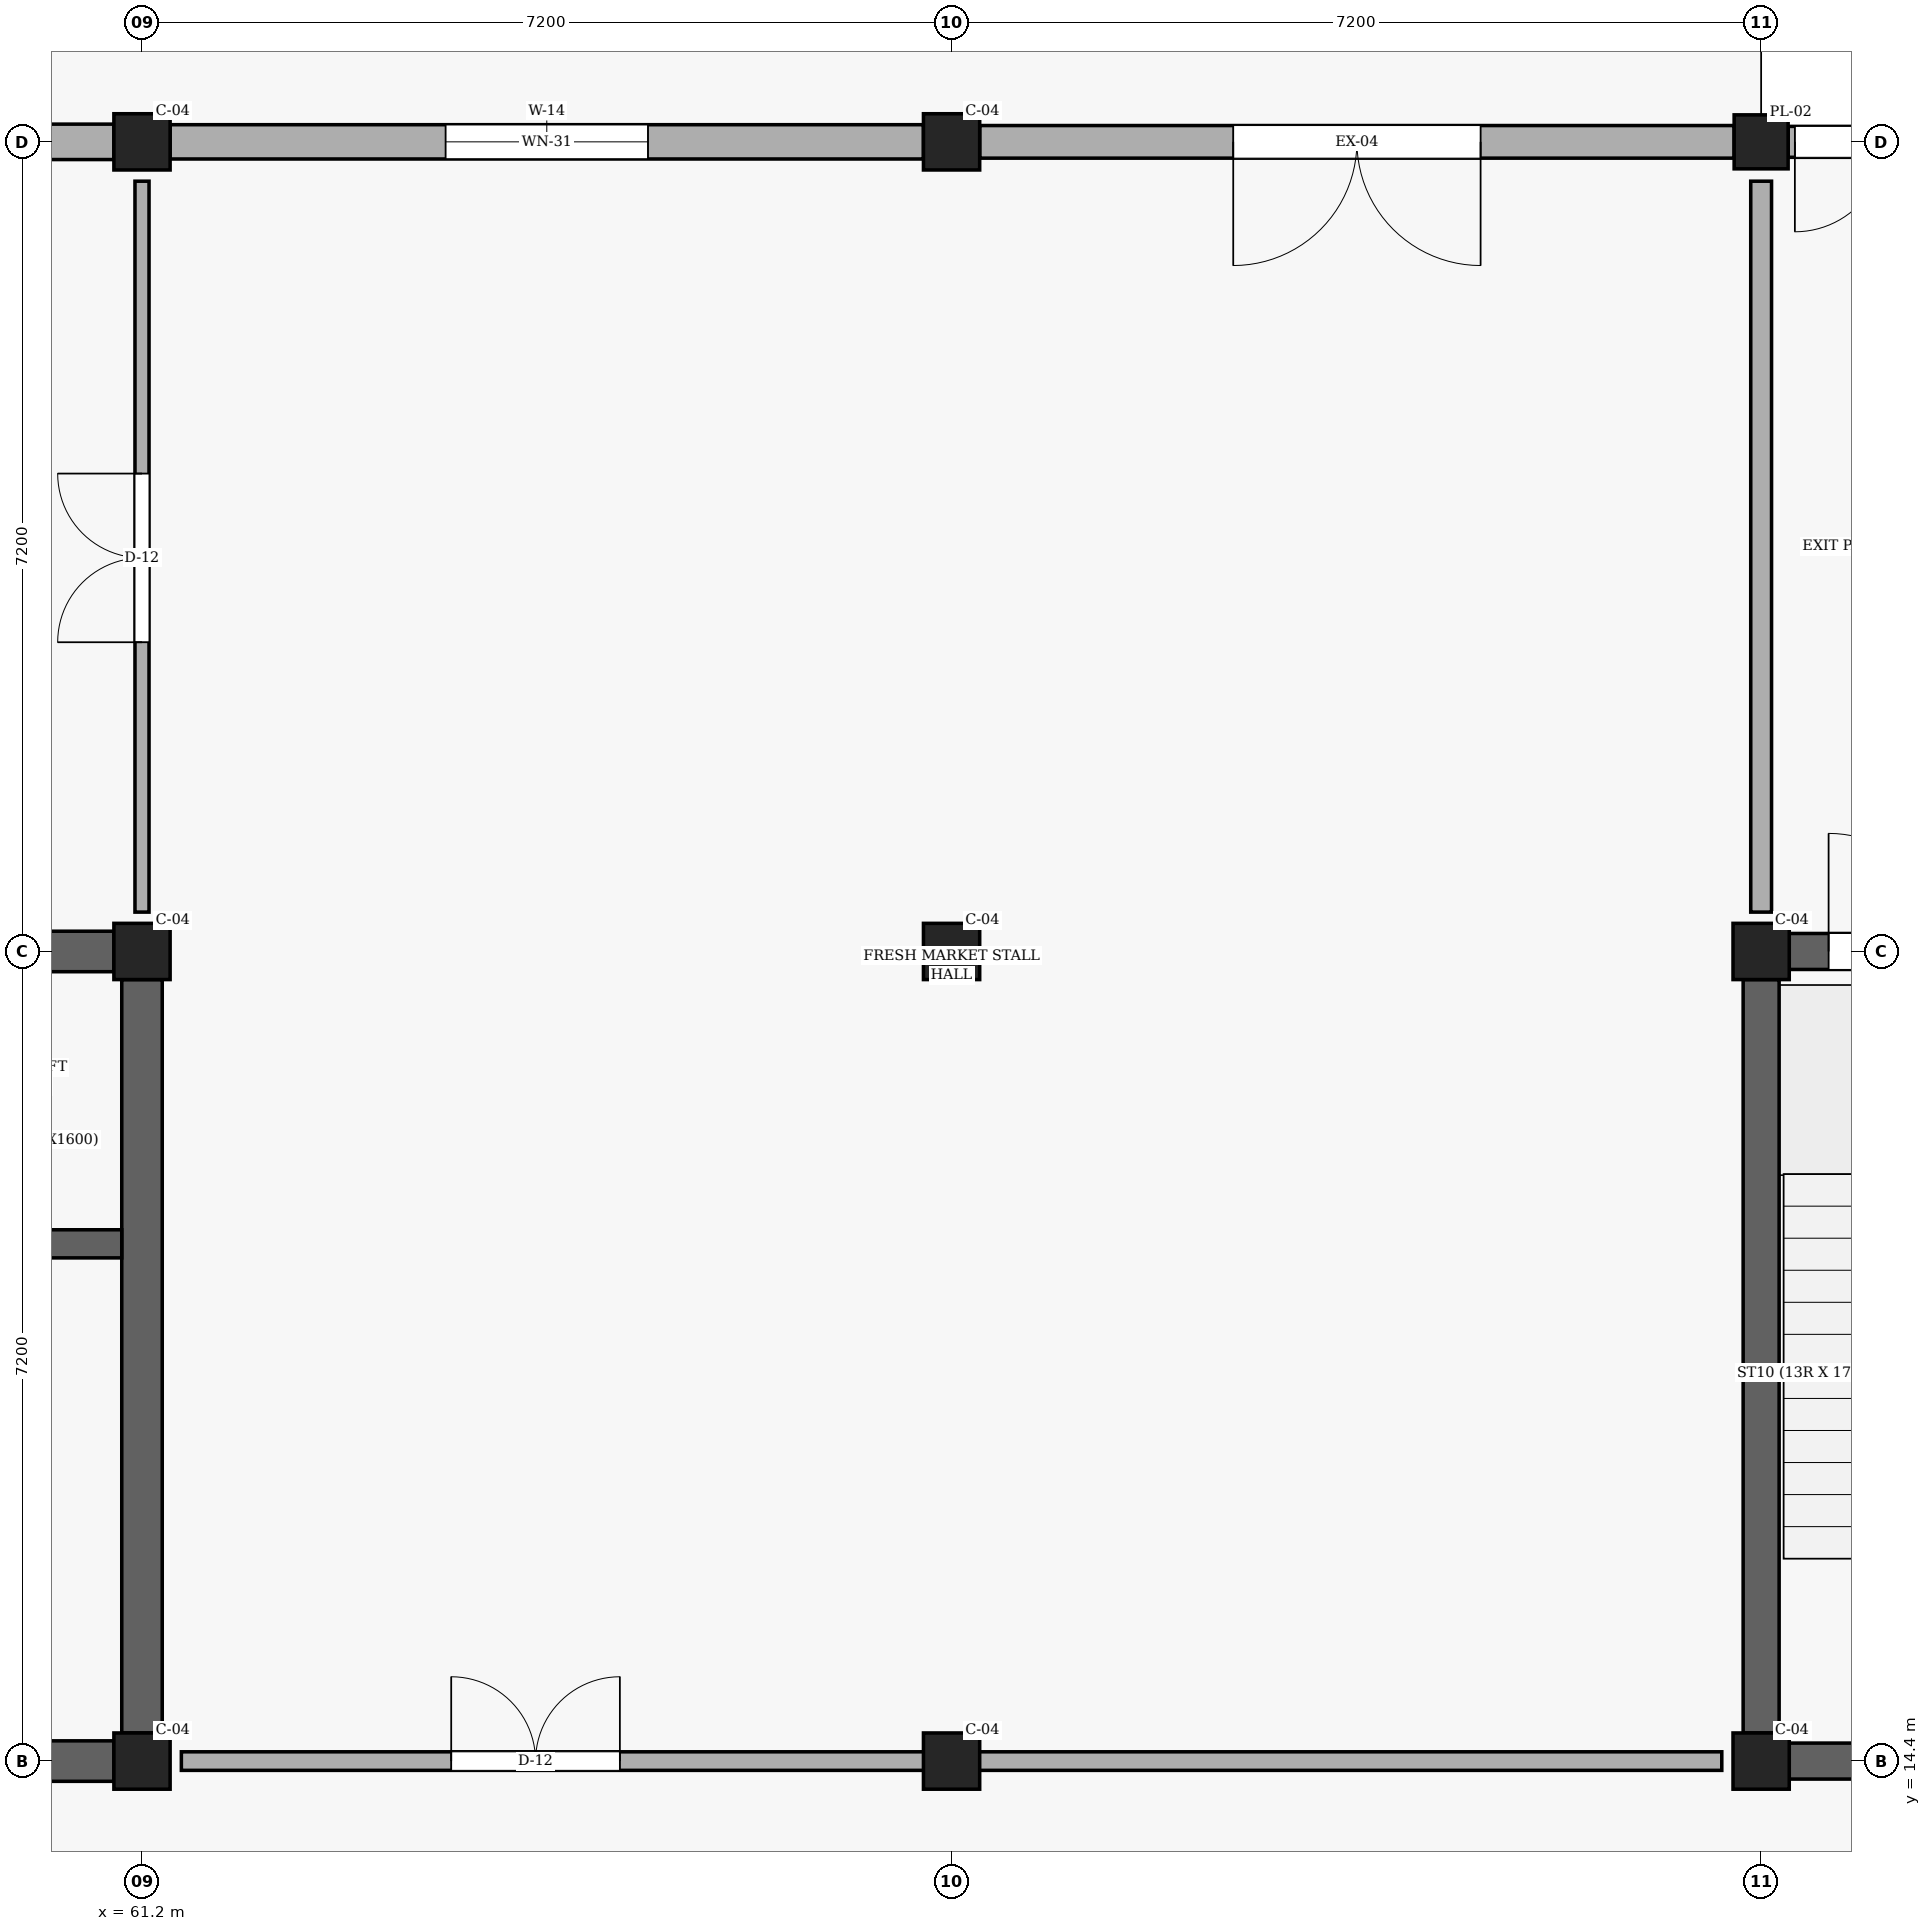
"""IFC4 building model, lengths in metres.
Left out: names, types, materials, properties, quantities, classifications, styles, units other than length and angle.
Written with IfcOpenShell. Run it as: python <this file> out.ifc"""

import sys

from ifc_helpers import new_model, si_unit, direction, frame, frame_2d, origin, origin_2d, place, context, subcontext, project, spatial, rectangle, extrude, element, fill, save


model = new_model("IFC4")
c1 = context("Model", 3, precision=1e-05, world=origin(), true_north=direction((0.0, 1.0)))
c2 = subcontext(c1, "Body", "Model", "MODEL_VIEW")
j1 = project(units=[si_unit("LENGTHUNIT", "METRE"), si_unit("PLANEANGLEUNIT", "RADIAN")], contexts=[c1])
p1 = place(None, origin())
s1 = spatial("IfcSite", under=j1, at=p1, CompositionType="ELEMENT")
p2 = place(p1, origin())
s2 = spatial("IfcBuilding", under=s1, at=p2, CompositionType="ELEMENT")
p3 = place(p2, origin())
s3 = spatial("IfcBuildingStorey", under=s2, at=p3, CompositionType="ELEMENT", Elevation=0.0)
for number, where, z_axis, x_axis in (
    (1, (61.2, 14.4, 0.0), (0.0, 0.0, 1.0), (1.0, 0.0, 0.0)),
    (2, (61.2, 21.6, 0.0), (0.0, 0.0, 1.0), (1.0, 0.0, 0.0)),
    (3, (61.2, 28.8, 0.0), (0.0, 0.0, 1.0), (1.0, 0.0, 0.0)),
    (4, (68.4, 14.4, 0.0), (0.0, 0.0, 1.0), (1.0, 0.0, 0.0)),
    (5, (68.4, 21.6, 0.0), (0.0, 0.0, 1.0), (1.0, 0.0, 0.0)),
    (6, (68.4, 28.8, 0.0), (0.0, 0.0, 1.0), (1.0, 0.0, 0.0)),
    (7, (75.6, 14.4, 0.0), (0.0, 0.0, 1.0), (1.0, 0.0, 0.0)),
    (8, (75.6, 21.6, 0.0), (0.0, 0.0, 1.0), (1.0, 0.0, 0.0)),
):
    element("IfcColumn", number, at=place(p3, frame(where, z_axis=z_axis, x_axis=x_axis)), inside=s3, PredefinedType="COLUMN", context=c2, shape_type="SweptSolid", body=[
        extrude(rectangle(XDim=0.5, YDim=0.5, at=origin_2d()), origin(), (0.0, 0.0, 1.0), 4.5),
    ])
p4 = place(p3, frame((75.6, 28.8, 0.0), z_axis=(0.0, 0.0, 1.0), x_axis=(1.0, 0.0, 0.0)))
e9 = element("IfcColumn", 9, at=p4, inside=s3, PredefinedType="PILASTER", context=c2, shape_type="SweptSolid", body=[
    extrude(rectangle(XDim=0.48, YDim=0.48, at=origin_2d()), origin(), (0.0, 0.0, 1.0), 4.5),
])
p5 = place(p3, frame((82.55, 28.8, 0.0), z_axis=(0.0, 0.0, 1.0), x_axis=(-1.0, 0.0, 0.0)))
e10 = element("IfcWall", 10, at=p5, inside=s3, PredefinedType="SOLIDWALL", context=c2, shape_type="SweptSolid", body=[
    extrude(rectangle(XDim=6.71, YDim=0.275, at=frame_2d((3.355, 0.0))), origin(), (0.0, 0.0, 1.0), 3.83),
])
p6 = place(p5, frame((2.305, 0.0, 0.85)))
e11 = element("IfcOpeningElement", 11, at=p6, cuts=e10, PredefinedType="OPENING", context=c2, shape_type="SweptSolid", body=[
    extrude(rectangle(XDim=2.1, YDim=2.1, at=frame_2d((1.05, 1.05))), frame((0.0, 0.147, 0.0), z_axis=(0.0, -1.0, 0.0), x_axis=(1.0, 0.0, 0.0)), (0.0, 0.0, 1.0), 0.295),
])
p7 = place(p5, frame((5.05, 0.0, 0.0)))
e12 = element("IfcOpeningElement", 12, at=p7, cuts=e10, PredefinedType="OPENING", context=c2, shape_type="SweptSolid", body=[
    extrude(rectangle(XDim=1.6, YDim=2.25, at=frame_2d((0.8, 1.125))), frame((0.0, 0.147, 0.0), z_axis=(0.0, -1.0, 0.0), x_axis=(1.0, 0.0, 0.0)), (0.0, 0.0, 1.0), 0.295),
])
p8 = place(p3, frame((75.36, 28.8, 0.0), z_axis=(0.0, 0.0, 1.0), x_axis=(-1.0, 0.0, 0.0)))
e13 = element("IfcWall", 13, at=p8, inside=s3, PredefinedType="SOLIDWALL", context=c2, shape_type="SweptSolid", body=[
    extrude(rectangle(XDim=6.71, YDim=0.29, at=frame_2d((3.355, 0.0))), origin(), (0.0, 0.0, 1.0), 3.83),
])
p9 = place(p8, frame((2.255, 0.0, 0.0)))
e14 = element("IfcOpeningElement", 14, at=p9, cuts=e13, PredefinedType="OPENING", context=c2, shape_type="SweptSolid", body=[
    extrude(rectangle(XDim=2.2, YDim=2.35, at=frame_2d((1.1, 1.175))), frame((0.0, 0.155, 0.0), z_axis=(0.0, -1.0, 0.0), x_axis=(1.0, 0.0, 0.0)), (0.0, 0.0, 1.0), 0.31),
])
p10 = place(p3, frame((68.15, 28.8, 0.0), z_axis=(0.0, 0.0, 1.0), x_axis=(-1.0, 0.0, 0.0)))
e15 = element("IfcWall", 15, at=p10, inside=s3, PredefinedType="SOLIDWALL", context=c2, shape_type="SweptSolid", body=[
    extrude(rectangle(XDim=6.7, YDim=0.305, at=frame_2d((3.35, 0.0))), origin(), (0.0, 0.0, 1.0), 3.83),
])
p11 = place(p10, frame((2.45, 0.0, 0.85)))
e16 = element("IfcOpeningElement", 16, at=p11, cuts=e15, PredefinedType="OPENING", context=c2, shape_type="SweptSolid", body=[
    extrude(rectangle(XDim=1.8, YDim=2.1, at=frame_2d((0.9, 1.05))), frame((0.0, 0.163, 0.0), z_axis=(0.0, -1.0, 0.0), x_axis=(1.0, 0.0, 0.0)), (0.0, 0.0, 1.0), 0.325),
])
p12 = place(p3, frame((60.95, 28.8, 0.0), z_axis=(0.0, 0.0, 1.0), x_axis=(-1.0, 0.0, 0.0)))
e17 = element("IfcWall", 17, at=p12, inside=s3, PredefinedType="SOLIDWALL", context=c2, shape_type="SweptSolid", body=[
    extrude(rectangle(XDim=6.71, YDim=0.315, at=frame_2d((3.355, 0.0))), origin(), (0.0, 0.0, 1.0), 3.83),
])
p13 = place(p12, frame((2.555, 0.0, 0.0)))
e18 = element("IfcOpeningElement", 18, at=p13, cuts=e17, PredefinedType="OPENING", context=c2, shape_type="SweptSolid", body=[
    extrude(rectangle(XDim=1.6, YDim=2.25, at=frame_2d((0.8, 1.125))), frame((0.0, 0.167, 0.0), z_axis=(0.0, -1.0, 0.0), x_axis=(1.0, 0.0, 0.0)), (0.0, 0.0, 1.0), 0.335),
])
p14 = place(p3, frame((54.25, 21.6, 0.0), z_axis=(0.0, 0.0, 1.0), x_axis=(1.0, 0.0, 0.0)))
e19 = element("IfcWall", 19, at=p14, inside=s3, PredefinedType="SHEAR", context=c2, shape_type="SweptSolid", body=[
    extrude(rectangle(XDim=6.7, YDim=0.36, at=frame_2d((3.35, 0.0))), origin(), (0.0, 0.0, 1.0), 4.26),
])
p15 = place(p3, frame((61.2, 14.65, 0.0), z_axis=(0.0, 0.0, 1.0), x_axis=(0.0, 1.0, 0.0)))
e20 = element("IfcWall", 20, at=p15, inside=s3, PredefinedType="SHEAR", context=c2, shape_type="SweptSolid", body=[
    extrude(rectangle(XDim=6.7, YDim=0.36, at=frame_2d((3.35, 0.0))), origin(), (0.0, 0.0, 1.0), 4.26),
])
p16 = place(p3, frame((54.25, 14.4, 0.0), z_axis=(0.0, 0.0, 1.0), x_axis=(1.0, 0.0, 0.0)))
e21 = element("IfcWall", 21, at=p16, inside=s3, PredefinedType="SHEAR", context=c2, shape_type="SweptSolid", body=[
    extrude(rectangle(XDim=6.7, YDim=0.36, at=frame_2d((3.35, 0.0))), origin(), (0.0, 0.0, 1.0), 4.26),
])
p17 = place(p16, frame((4.5, 0.0, 0.0)))
e22 = element("IfcOpeningElement", 22, at=p17, cuts=e21, PredefinedType="OPENING", context=c2, shape_type="SweptSolid", body=[
    extrude(rectangle(XDim=1.1, YDim=2.15, at=frame_2d((0.55, 1.075))), frame((0.0, 0.19, 0.0), z_axis=(0.0, -1.0, 0.0), x_axis=(1.0, 0.0, 0.0)), (0.0, 0.0, 1.0), 0.38),
])
p18 = place(p3, frame((57.725, 19.0, 0.0), z_axis=(0.0, 0.0, 1.0), x_axis=(1.0, 0.0, 0.0)))
e23 = element("IfcWall", 23, at=p18, inside=s3, PredefinedType="SHEAR", context=c2, shape_type="SweptSolid", body=[
    extrude(rectangle(XDim=3.295, YDim=0.25, at=frame_2d((1.647, 0.0))), origin(), (0.0, 0.0, 1.0), 4.26),
])
p19 = place(p18, frame((1.1, 0.0, 0.0)))
e24 = element("IfcOpeningElement", 24, at=p19, cuts=e23, PredefinedType="OPENING", context=c2, shape_type="SweptSolid", body=[
    extrude(rectangle(XDim=1.0, YDim=2.2, at=frame_2d((0.5, 1.1))), frame((0.0, 0.135, 0.0), z_axis=(0.0, -1.0, 0.0), x_axis=(1.0, 0.0, 0.0)), (0.0, 0.0, 1.0), 0.27),
])
p20 = place(p3, frame((75.6, 14.65, 0.0), z_axis=(0.0, 0.0, 1.0), x_axis=(0.0, 1.0, 0.0)))
e25 = element("IfcWall", 25, at=p20, inside=s3, PredefinedType="SHEAR", context=c2, shape_type="SweptSolid", body=[
    extrude(rectangle(XDim=6.7, YDim=0.32, at=frame_2d((3.35, 0.0))), origin(), (0.0, 0.0, 1.0), 4.26),
])
p21 = place(p3, frame((75.85, 21.6, 0.0), z_axis=(0.0, 0.0, 1.0), x_axis=(1.0, 0.0, 0.0)))
e26 = element("IfcWall", 26, at=p21, inside=s3, PredefinedType="SHEAR", context=c2, shape_type="SweptSolid", body=[
    extrude(rectangle(XDim=3.19, YDim=0.32, at=frame_2d((1.595, 0.0))), origin(), (0.0, 0.0, 1.0), 4.26),
])
p22 = place(p21, frame((0.35, 0.0, 0.0)))
e27 = element("IfcOpeningElement", 27, at=p22, cuts=e26, PredefinedType="OPENING", context=c2, shape_type="SweptSolid", body=[
    extrude(rectangle(XDim=1.05, YDim=2.15, at=frame_2d((0.525, 1.075))), frame((0.0, 0.17, 0.0), z_axis=(0.0, -1.0, 0.0), x_axis=(1.0, 0.0, 0.0)), (0.0, 0.0, 1.0), 0.34),
])
p23 = place(p3, frame((75.85, 14.4, 0.0), z_axis=(0.0, 0.0, 1.0), x_axis=(1.0, 0.0, 0.0)))
e28 = element("IfcWall", 28, at=p23, inside=s3, PredefinedType="SHEAR", context=c2, shape_type="SweptSolid", body=[
    extrude(rectangle(XDim=3.19, YDim=0.32, at=frame_2d((1.595, 0.0))), origin(), (0.0, 0.0, 1.0), 4.26),
])
p24 = place(p23, frame((1.0, 0.0, 0.0)))
e29 = element("IfcOpeningElement", 29, at=p24, cuts=e28, PredefinedType="OPENING", context=c2, shape_type="SweptSolid", body=[
    extrude(rectangle(XDim=1.05, YDim=2.15, at=frame_2d((0.525, 1.075))), frame((0.0, 0.17, 0.0), z_axis=(0.0, -1.0, 0.0), x_axis=(1.0, 0.0, 0.0)), (0.0, 0.0, 1.0), 0.34),
])
p25 = place(p3, frame((61.55, 14.4, 0.0), z_axis=(0.0, 0.0, 1.0), x_axis=(1.0, 0.0, 0.0)))
e30 = element("IfcWall", 30, at=p25, inside=s3, PredefinedType="PARTITIONING", context=c2, shape_type="SweptSolid", body=[
    extrude(rectangle(XDim=13.7, YDim=0.165, at=frame_2d((6.85, 0.0))), origin(), (0.0, 0.0, 1.0), 3.41),
])
p26 = place(p25, frame((2.4, 0.0, 0.0)))
e31 = element("IfcOpeningElement", 31, at=p26, cuts=e30, PredefinedType="OPENING", context=c2, shape_type="SweptSolid", body=[
    extrude(rectangle(XDim=1.5, YDim=2.25, at=frame_2d((0.75, 1.125))), frame((0.0, 0.093, 0.0), z_axis=(0.0, -1.0, 0.0), x_axis=(1.0, 0.0, 0.0)), (0.0, 0.0, 1.0), 0.185),
])
p27 = place(p3, frame((61.2, 21.95, 0.0), z_axis=(0.0, 0.0, 1.0), x_axis=(0.0, 1.0, 0.0)))
e32 = element("IfcWall", 32, at=p27, inside=s3, PredefinedType="PARTITIONING", context=c2, shape_type="SweptSolid", body=[
    extrude(rectangle(XDim=6.5, YDim=0.125, at=frame_2d((3.25, 0.0))), origin(), (0.0, 0.0, 1.0), 3.41),
])
p28 = place(p27, frame((2.4, 0.0, 0.0)))
e33 = element("IfcOpeningElement", 33, at=p28, cuts=e32, PredefinedType="OPENING", context=c2, shape_type="SweptSolid", body=[
    extrude(rectangle(XDim=1.5, YDim=2.25, at=frame_2d((0.75, 1.125))), frame((0.0, 0.073, 0.0), z_axis=(0.0, -1.0, 0.0), x_axis=(1.0, 0.0, 0.0)), (0.0, 0.0, 1.0), 0.145),
])
p29 = place(p3, frame((75.6, 21.95, 0.0), z_axis=(0.0, 0.0, 1.0), x_axis=(0.0, 1.0, 0.0)))
e34 = element("IfcWall", 34, at=p29, inside=s3, PredefinedType="PARTITIONING", context=c2, shape_type="SweptSolid", body=[
    extrude(rectangle(XDim=6.5, YDim=0.185, at=frame_2d((3.25, 0.0))), origin(), (0.0, 0.0, 1.0), 3.41),
])
p30 = place(p9, frame((2.2, 0.0, 0.0), z_axis=(0.0, 0.0, 1.0), x_axis=(-1.0, 0.0, 0.0)))
e35 = element("IfcDoor", 35, at=p30, inside=s3, OperationType="DOUBLE_DOOR_SINGLE_SWING", PredefinedType="DOOR", context=c2, shape_type="SweptSolid", body=[
    extrude(rectangle(XDim=2.2, YDim=2.35, at=frame_2d((1.1, 1.175))), frame((0.0, 0.025, 0.0), z_axis=(0.0, -1.0, 0.0), x_axis=(1.0, 0.0, 0.0)), (0.0, 0.0, 1.0), 0.05),
])
fill(e14, e35)
p31 = place(p11, origin())
e36 = element("IfcWindow", 36, at=p31, inside=s3, PartitioningType="SINGLE_PANEL", PredefinedType="WINDOW", context=c2, shape_type="SweptSolid", body=[
    extrude(rectangle(XDim=1.8, YDim=2.1, at=frame_2d((0.9, 1.05))), frame((0.0, 0.03, 0.0), z_axis=(0.0, -1.0, 0.0), x_axis=(1.0, 0.0, 0.0)), (0.0, 0.0, 1.0), 0.06),
])
fill(e16, e36)
p32 = place(p26, origin())
e37 = element("IfcDoor", 37, at=p32, inside=s3, OperationType="DOUBLE_DOOR_SINGLE_SWING", PredefinedType="DOOR", context=c2, shape_type="SweptSolid", body=[
    extrude(rectangle(XDim=1.5, YDim=2.25, at=frame_2d((0.75, 1.125))), frame((0.0, 0.025, 0.0), z_axis=(0.0, -1.0, 0.0), x_axis=(1.0, 0.0, 0.0)), (0.0, 0.0, 1.0), 0.05),
])
fill(e31, e37)
p33 = place(p28, origin())
e38 = element("IfcDoor", 38, at=p33, inside=s3, OperationType="DOUBLE_DOOR_SINGLE_SWING", PredefinedType="DOOR", context=c2, shape_type="SweptSolid", body=[
    extrude(rectangle(XDim=1.5, YDim=2.25, at=frame_2d((0.75, 1.125))), frame((0.0, 0.025, 0.0), z_axis=(0.0, -1.0, 0.0), x_axis=(1.0, 0.0, 0.0)), (0.0, 0.0, 1.0), 0.05),
])
fill(e33, e38)
p34 = place(p22, origin())
e39 = element("IfcDoor", 39, at=p34, inside=s3, OperationType="SINGLE_SWING_LEFT", PredefinedType="DOOR", context=c2, shape_type="SweptSolid", body=[
    extrude(rectangle(XDim=1.05, YDim=2.15, at=frame_2d((0.525, 1.075))), frame((0.0, 0.025, 0.0), z_axis=(0.0, -1.0, 0.0), x_axis=(1.0, 0.0, 0.0)), (0.0, 0.0, 1.0), 0.05),
])
fill(e27, e39)
p35 = place(p7, frame((1.6, 0.0, 0.0), z_axis=(0.0, 0.0, 1.0), x_axis=(-1.0, 0.0, 0.0)))
e40 = element("IfcDoor", 40, at=p35, inside=s3, OperationType="DOUBLE_DOOR_SINGLE_SWING", PredefinedType="DOOR", context=c2, shape_type="SweptSolid", body=[
    extrude(rectangle(XDim=1.6, YDim=2.25, at=frame_2d((0.8, 1.125))), frame((0.0, 0.025, 0.0), z_axis=(0.0, -1.0, 0.0), x_axis=(1.0, 0.0, 0.0)), (0.0, 0.0, 1.0), 0.05),
])
fill(e12, e40)
save(model, sys.argv[1])
